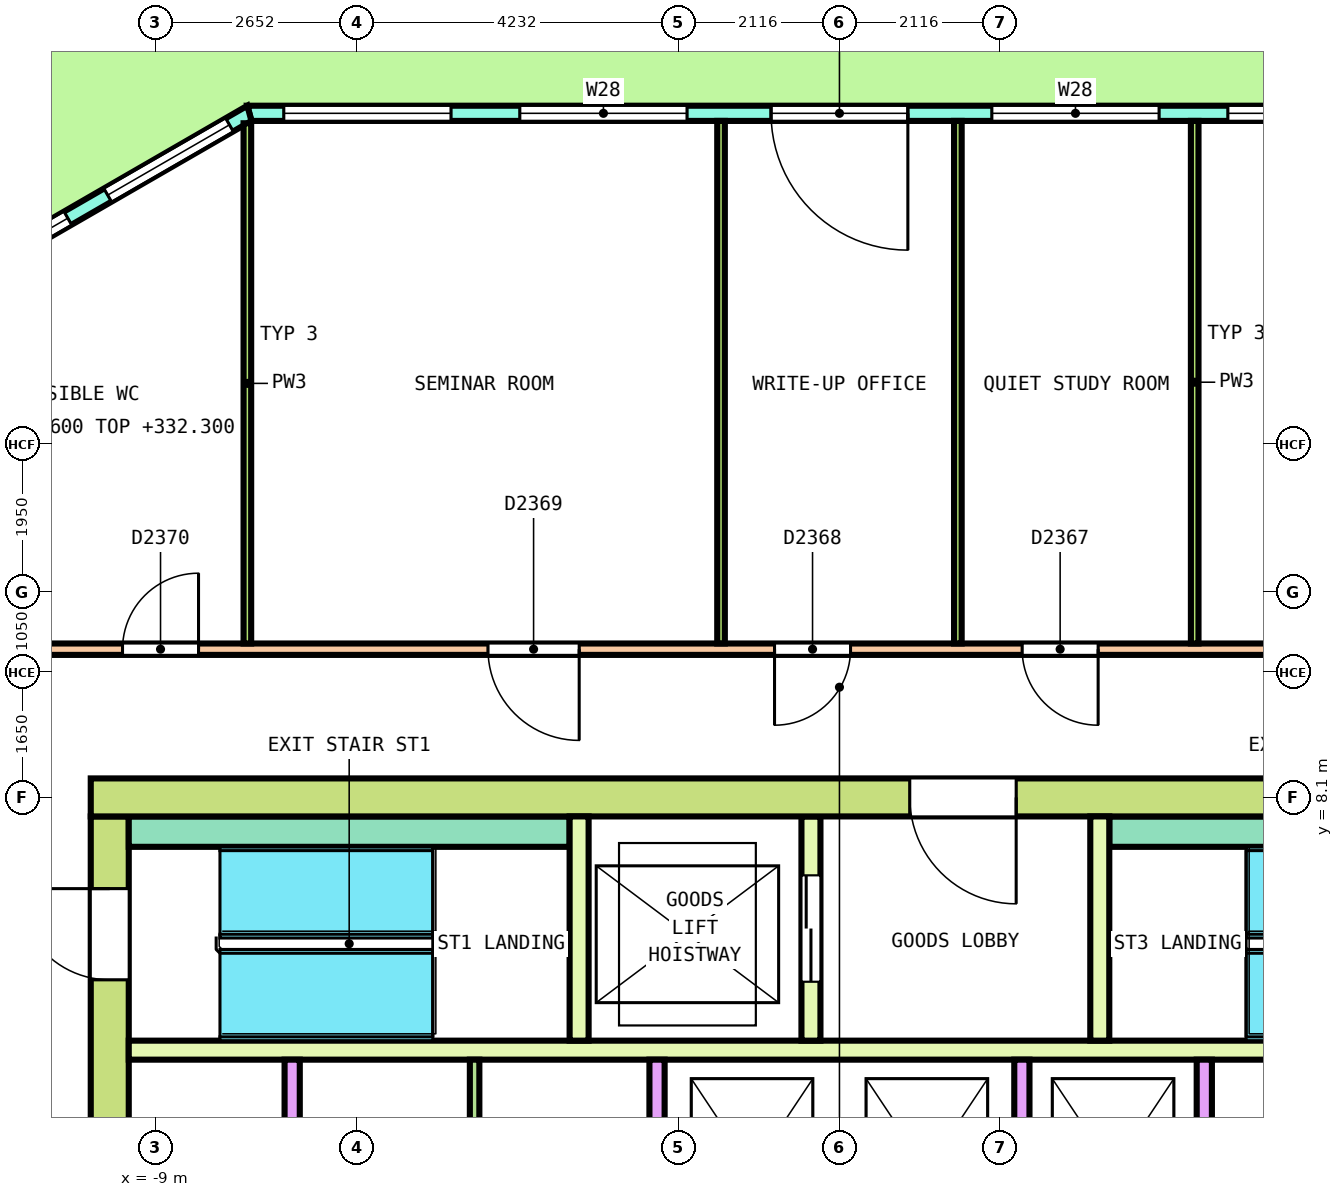
"""IFC4 building model, lengths in metres.
Left out: names, types, materials, properties, quantities, classifications, styles, units other than length and angle.
Written with IfcOpenShell. Run it as: python <this file> out.ifc"""

import sys

from ifc_helpers import new_model, si_unit, direction, frame, frame_2d, origin, place, context, subcontext, project, spatial, polyline, rectangle, outline, extrude, element, fill, save


model = new_model("IFC4")
c1 = context("Model", 3, precision=1e-05, world=origin(), true_north=direction((0.0, 1.0)))
c2 = subcontext(c1, "Body", "Model", "MODEL_VIEW")
j1 = project(units=[si_unit("LENGTHUNIT", "METRE"), si_unit("PLANEANGLEUNIT", "RADIAN")], contexts=[c1])
p1 = place(None, origin())
s1 = spatial("IfcSite", under=j1, at=p1, CompositionType="ELEMENT")
p2 = place(p1, origin())
s2 = spatial("IfcBuilding", under=s1, at=p2, CompositionType="ELEMENT")
p3 = place(p2, frame((0.0, 0.0, 328.6)))
s3 = spatial("IfcBuildingStorey", under=s2, at=p3, CompositionType="ELEMENT", Elevation=328.6)
p4 = place(p3, frame((7.763, 17.1, 0.0), z_axis=(0.0, 0.0, 1.0), x_axis=(-1.0, 0.0, 0.0)))
e1 = element("IfcWall", 1, at=p4, inside=s3, PredefinedType="SOLIDWALL", context=c2, shape_type="SweptSolid", body=[
    extrude(outline(polyline([(-0.027, -0.1), (1.012, -0.1), (2.05, -0.1), (3.089, -0.1), (4.128, -0.1), (5.166, -0.1), (6.205, -0.1), (7.243, -0.1), (8.282, -0.1), (9.321, -0.1), (10.359, -0.1), (11.398, -0.1), (12.437, -0.1), (13.475, -0.1), (14.514, -0.1), (15.552, -0.1), (15.499, 0.1), (14.467, 0.1), (13.436, 0.1), (12.404, 0.1), (11.373, 0.1), (10.341, 0.1), (9.31, 0.1), (8.278, 0.1), (7.247, 0.1), (6.216, 0.1), (5.184, 0.1), (4.153, 0.1), (3.121, 0.1), (2.09, 0.1), (1.058, 0.1), (0.027, 0.1), (-0.027, -0.1)])), origin(), (0.0, 0.0, 1.0), 3.7),
])
p5 = place(p4, frame((0.452, 0.0, 0.1)))
e2 = element("IfcOpeningElement", 2, at=p5, cuts=e1, PredefinedType="OPENING", context=c2, shape_type="SweptSolid", body=[
    extrude(rectangle(XDim=2.2, YDim=2.9, at=frame_2d((1.1, 1.45))), frame((0.0, 0.11, 0.0), z_axis=(0.0, -1.0, 0.0), x_axis=(1.0, 0.0, 0.0)), (0.0, 0.0, 1.0), 0.22),
])
p6 = place(p4, frame((3.558, 0.0, 0.1)))
e3 = element("IfcOpeningElement", 3, at=p6, cuts=e1, PredefinedType="OPENING", context=c2, shape_type="SweptSolid", body=[
    extrude(rectangle(XDim=2.2, YDim=2.9, at=frame_2d((1.1, 1.45))), frame((0.0, 0.11, 0.0), z_axis=(0.0, -1.0, 0.0), x_axis=(1.0, 0.0, 0.0)), (0.0, 0.0, 1.0), 0.22),
])
p7 = place(p4, frame((6.863, 0.0, 0.0)))
e4 = element("IfcOpeningElement", 4, at=p7, cuts=e1, PredefinedType="OPENING", context=c2, shape_type="SweptSolid", body=[
    extrude(rectangle(XDim=1.8, YDim=2.4, at=frame_2d((0.9, 1.2))), frame((0.0, 0.11, 0.0), z_axis=(0.0, -1.0, 0.0), x_axis=(1.0, 0.0, 0.0)), (0.0, 0.0, 1.0), 0.22),
])
p8 = place(p4, frame((6.863, 0.0, 2.55)))
e5 = element("IfcOpeningElement", 5, at=p8, cuts=e1, PredefinedType="OPENING", context=c2, shape_type="SweptSolid", body=[
    extrude(rectangle(XDim=1.8, YDim=0.45, at=frame_2d((0.9, 0.225))), frame((0.0, 0.11, 0.0), z_axis=(0.0, -1.0, 0.0), x_axis=(1.0, 0.0, 0.0)), (0.0, 0.0, 1.0), 0.22),
])
p9 = place(p4, frame((9.768, 0.0, 0.1)))
e6 = element("IfcOpeningElement", 6, at=p9, cuts=e1, PredefinedType="OPENING", context=c2, shape_type="SweptSolid", body=[
    extrude(rectangle(XDim=2.2, YDim=2.9, at=frame_2d((1.1, 1.45))), frame((0.0, 0.11, 0.0), z_axis=(0.0, -1.0, 0.0), x_axis=(1.0, 0.0, 0.0)), (0.0, 0.0, 1.0), 0.22),
])
p10 = place(p4, frame((12.873, 0.0, 0.1)))
e7 = element("IfcOpeningElement", 7, at=p10, cuts=e1, PredefinedType="OPENING", context=c2, shape_type="SweptSolid", body=[
    extrude(rectangle(XDim=2.2, YDim=2.9, at=frame_2d((1.1, 1.45))), frame((0.0, 0.11, 0.0), z_axis=(0.0, -1.0, 0.0), x_axis=(1.0, 0.0, 0.0)), (0.0, 0.0, 1.0), 0.22),
])
p11 = place(p3, frame((-7.763, 17.1, 0.0), z_axis=(0.0, 0.0, 1.0), x_axis=(-0.866029143232, -0.499993523031, 0.0)))
e8 = element("IfcWall", 8, at=p11, inside=s3, PredefinedType="SOLIDWALL", context=c2, shape_type="SweptSolid", body=[
    extrude(outline(polyline([(-0.027, -0.1), (1.214, -0.1), (2.456, -0.1), (3.697, -0.1), (4.938, -0.1), (4.885, 0.1), (3.67, 0.1), (2.456, 0.1), (1.241, 0.1), (0.027, 0.1), (-0.027, -0.1)])), origin(), (0.0, 0.0, 1.0), 3.7),
])
p12 = place(p11, frame((0.303, 0.0, 0.1)))
e9 = element("IfcOpeningElement", 9, at=p12, cuts=e8, PredefinedType="OPENING", context=c2, shape_type="SweptSolid", body=[
    extrude(rectangle(XDim=1.85, YDim=2.9, at=frame_2d((0.925, 1.45))), frame((0.0, 0.11, 0.0), z_axis=(0.0, -1.0, 0.0), x_axis=(1.0, 0.0, 0.0)), (0.0, 0.0, 1.0), 0.22),
])
p13 = place(p11, frame((2.759, 0.0, 0.1)))
e10 = element("IfcOpeningElement", 10, at=p13, cuts=e8, PredefinedType="OPENING", context=c2, shape_type="SweptSolid", body=[
    extrude(rectangle(XDim=1.85, YDim=2.9, at=frame_2d((0.925, 1.45))), frame((0.0, 0.11, 0.0), z_axis=(0.0, -1.0, 0.0), x_axis=(1.0, 0.0, 0.0)), (0.0, 0.0, 1.0), 0.22),
])
p14 = place(p3, frame((-9.85, 8.1, 0.0), z_axis=(0.0, 0.0, 1.0), x_axis=(1.0, 0.0, 0.0)))
e11 = element("IfcWall", 11, at=p14, inside=s3, PredefinedType="SHEAR", context=c2, shape_type="SweptSolid", body=[
    extrude(rectangle(XDim=19.7, YDim=0.5, at=frame_2d((9.85, 0.0))), origin(), (0.0, 0.0, 1.0), 3.7),
])
p15 = place(p14, frame((10.775, 0.0, 0.0)))
e12 = element("IfcOpeningElement", 12, at=p15, cuts=e11, PredefinedType="OPENING", context=c2, shape_type="SweptSolid", body=[
    extrude(rectangle(XDim=1.4, YDim=2.1, at=frame_2d((0.7, 1.05))), frame((0.0, 0.26, 0.0), z_axis=(0.0, -1.0, 0.0), x_axis=(1.0, 0.0, 0.0)), (0.0, 0.0, 1.0), 0.52),
])
p16 = place(p3, frame((-9.6, -7.85, 0.0), z_axis=(0.0, 0.0, 1.0), x_axis=(0.0, 1.0, 0.0)))
e13 = element("IfcWall", 13, at=p16, inside=s3, PredefinedType="SHEAR", context=c2, shape_type="SweptSolid", body=[
    extrude(rectangle(XDim=15.7, YDim=0.5, at=frame_2d((7.85, 0.0))), origin(), (0.0, 0.0, 1.0), 3.7),
])
p17 = place(p16, frame((6.65, 0.0, 0.0)))
e14 = element("IfcOpeningElement", 14, at=p17, cuts=e13, PredefinedType="OPENING", context=c2, shape_type="SweptSolid", body=[
    extrude(rectangle(XDim=2.4, YDim=2.1, at=frame_2d((1.2, 1.05))), frame((0.0, 0.26, 0.0), z_axis=(0.0, -1.0, 0.0), x_axis=(1.0, 0.0, 0.0)), (0.0, 0.0, 1.0), 0.52),
])
p18 = place(p16, frame((13.55, 0.0, 0.0)))
e15 = element("IfcOpeningElement", 15, at=p18, cuts=e13, PredefinedType="OPENING", context=c2, shape_type="SweptSolid", body=[
    extrude(rectangle(XDim=1.2, YDim=2.1, at=frame_2d((0.6, 1.05))), frame((0.0, 0.26, 0.0), z_axis=(0.0, -1.0, 0.0), x_axis=(1.0, 0.0, 0.0)), (0.0, 0.0, 1.0), 0.52),
])
p19 = place(p16, frame((0.95, 0.0, 0.0)))
e16 = element("IfcOpeningElement", 16, at=p19, cuts=e13, PredefinedType="OPENING", context=c2, shape_type="SweptSolid", body=[
    extrude(rectangle(XDim=1.2, YDim=2.1, at=frame_2d((0.6, 1.05))), frame((0.0, 0.26, 0.0), z_axis=(0.0, -1.0, 0.0), x_axis=(1.0, 0.0, 0.0)), (0.0, 0.0, 1.0), 0.52),
])
p20 = place(p3, frame((-9.35, 4.775, 0.0), z_axis=(0.0, 0.0, 1.0), x_axis=(1.0, 0.0, 0.0)))
e17 = element("IfcWall", 17, at=p20, inside=s3, PredefinedType="SOLIDWALL", context=c2, shape_type="SweptSolid", body=[
    extrude(rectangle(XDim=18.7, YDim=0.25, at=frame_2d((9.35, 0.0))), origin(), (0.0, 0.0, 1.0), 3.7),
])
for number, where, z_axis, x_axis in (
    (18, (-7.2, 1.75, 0.0), (0.0, 0.0, 1.0), (0.0, 1.0, 0.0)),
    (19, (-2.4, 1.75, 0.0), (0.0, 0.0, 1.0), (0.0, 1.0, 0.0)),
    (20, (2.4, 1.75, 0.0), (0.0, 0.0, 1.0), (0.0, 1.0, 0.0)),
    (21, (4.8, 1.75, 0.0), (0.0, 0.0, 1.0), (0.0, 1.0, 0.0)),
):
    element("IfcWall", number, at=place(p3, frame(where, z_axis=z_axis, x_axis=x_axis)), inside=s3, PredefinedType="SOLIDWALL", context=c2, shape_type="SweptSolid", body=[
        extrude(rectangle(XDim=2.9, YDim=0.2, at=frame_2d((1.45, 0.0))), origin(), (0.0, 0.0, 1.0), 3.7),
    ])
for number, where, z_axis, x_axis in (
    (22, (-9.35, 7.65, 0.0), (0.0, 0.0, 1.0), (1.0, 0.0, 0.0)),
    (23, (3.55, 7.65, 0.0), (0.0, 0.0, 1.0), (1.0, 0.0, 0.0)),
):
    element("IfcWall", number, at=place(p3, frame(where, z_axis=z_axis, x_axis=x_axis)), inside=s3, PredefinedType="SOLIDWALL", context=c2, shape_type="SweptSolid", body=[
        extrude(rectangle(XDim=5.8, YDim=0.4, at=frame_2d((2.9, 0.0))), origin(), (0.0, 0.0, 1.0), 3.7),
    ])
p21 = place(p3, frame((-3.425, 4.9, 0.0), z_axis=(0.0, 0.0, 1.0), x_axis=(0.0, 1.0, 0.0)))
e24 = element("IfcWall", 24, at=p21, inside=s3, PredefinedType="SOLIDWALL", context=c2, shape_type="SweptSolid", body=[
    extrude(rectangle(XDim=2.95, YDim=0.25, at=frame_2d((1.475, 0.0))), origin(), (0.0, 0.0, 1.0), 3.7),
])
p22 = place(p3, frame((-0.375, 4.9, 0.0), z_axis=(0.0, 0.0, 1.0), x_axis=(0.0, 1.0, 0.0)))
e25 = element("IfcWall", 25, at=p22, inside=s3, PredefinedType="SOLIDWALL", context=c2, shape_type="SweptSolid", body=[
    extrude(rectangle(XDim=2.95, YDim=0.25, at=frame_2d((1.475, 0.0))), origin(), (0.0, 0.0, 1.0), 3.7),
])
p23 = place(p22, frame((0.775, 0.0, 0.0)))
e26 = element("IfcOpeningElement", 26, at=p23, cuts=e25, PredefinedType="OPENING", context=c2, shape_type="SweptSolid", body=[
    extrude(rectangle(XDim=1.4, YDim=2.1, at=frame_2d((0.7, 1.05))), frame((0.0, 0.135, 0.0), z_axis=(0.0, -1.0, 0.0), x_axis=(1.0, 0.0, 0.0)), (0.0, 0.0, 1.0), 0.27),
])
p24 = place(p3, frame((3.425, 4.9, 0.0), z_axis=(0.0, 0.0, 1.0), x_axis=(0.0, 1.0, 0.0)))
e27 = element("IfcWall", 27, at=p24, inside=s3, PredefinedType="SOLIDWALL", context=c2, shape_type="SweptSolid", body=[
    extrude(rectangle(XDim=2.95, YDim=0.25, at=frame_2d((1.475, 0.0))), origin(), (0.0, 0.0, 1.0), 3.7),
])
p25 = place(p3, frame((-4.8, 1.75, 0.0), z_axis=(0.0, 0.0, 1.0), x_axis=(0.0, 1.0, 0.0)))
e28 = element("IfcWall", 28, at=p25, inside=s3, PredefinedType="PARTITIONING", context=c2, shape_type="SweptSolid", body=[
    extrude(rectangle(XDim=2.9, YDim=0.125, at=frame_2d((1.45, 0.0))), origin(), (0.0, 0.0, 1.0), 3.7),
])
p26 = place(p3, frame((-10.875, 10.05, 0.0), z_axis=(0.0, 0.0, 1.0), x_axis=(1.0, 0.0, 0.0)))
e29 = element("IfcWall", 29, at=p26, inside=s3, PredefinedType="PARTITIONING", context=c2, shape_type="SweptSolid", body=[
    extrude(rectangle(XDim=21.9, YDim=0.15, at=frame_2d((10.95, 0.0))), origin(), (0.0, 0.0, 1.0), 3.05),
])
p27 = place(p26, frame((18.743, 0.0, 0.0)))
e30 = element("IfcOpeningElement", 30, at=p27, cuts=e29, PredefinedType="OPENING", context=c2, shape_type="SweptSolid", body=[
    extrude(rectangle(XDim=1.2, YDim=2.1, at=frame_2d((0.6, 1.05))), frame((0.0, 0.085, 0.0), z_axis=(0.0, -1.0, 0.0), x_axis=(1.0, 0.0, 0.0)), (0.0, 0.0, 1.0), 0.17),
])
p28 = place(p26, frame((13.278, 0.0, 0.0)))
e31 = element("IfcOpeningElement", 31, at=p28, cuts=e29, PredefinedType="OPENING", context=c2, shape_type="SweptSolid", body=[
    extrude(rectangle(XDim=1.0, YDim=2.1, at=frame_2d((0.5, 1.05))), frame((0.0, 0.085, 0.0), z_axis=(0.0, -1.0, 0.0), x_axis=(1.0, 0.0, 0.0)), (0.0, 0.0, 1.0), 0.17),
])
p29 = place(p26, frame((10.021, 0.0, 0.0)))
e32 = element("IfcOpeningElement", 32, at=p29, cuts=e29, PredefinedType="OPENING", context=c2, shape_type="SweptSolid", body=[
    extrude(rectangle(XDim=1.0, YDim=2.1, at=frame_2d((0.5, 1.05))), frame((0.0, 0.085, 0.0), z_axis=(0.0, -1.0, 0.0), x_axis=(1.0, 0.0, 0.0)), (0.0, 0.0, 1.0), 0.17),
])
p30 = place(p26, frame((6.251, 0.0, 0.0)))
e33 = element("IfcOpeningElement", 33, at=p30, cuts=e29, PredefinedType="OPENING", context=c2, shape_type="SweptSolid", body=[
    extrude(rectangle(XDim=1.2, YDim=2.1, at=frame_2d((0.6, 1.05))), frame((0.0, 0.085, 0.0), z_axis=(0.0, -1.0, 0.0), x_axis=(1.0, 0.0, 0.0)), (0.0, 0.0, 1.0), 0.17),
])
p31 = place(p26, frame((1.443, 0.0, 0.0)))
e34 = element("IfcOpeningElement", 34, at=p31, cuts=e29, PredefinedType="OPENING", context=c2, shape_type="SweptSolid", body=[
    extrude(rectangle(XDim=1.0, YDim=2.1, at=frame_2d((0.5, 1.05))), frame((0.0, 0.085, 0.0), z_axis=(0.0, -1.0, 0.0), x_axis=(1.0, 0.0, 0.0)), (0.0, 0.0, 1.0), 0.17),
])
for number, where, z_axis, x_axis in (
    (35, (4.674, 10.125, 0.0), (0.0, 0.0, 1.0), (0.0, 1.0, 0.0)),
    (36, (1.558, 10.125, 0.0), (0.0, 0.0, 1.0), (0.0, 1.0, 0.0)),
    (37, (-1.558, 10.125, 0.0), (0.0, 0.0, 1.0), (0.0, 1.0, 0.0)),
):
    element("IfcWall", number, at=place(p3, frame(where, z_axis=z_axis, x_axis=x_axis)), inside=s3, PredefinedType="PARTITIONING", context=c2, shape_type="SweptSolid", body=[
        extrude(rectangle(XDim=6.875, YDim=0.1, at=frame_2d((3.438, 0.0))), origin(), (0.0, 0.0, 1.0), 3.05),
    ])
p32 = place(p3, frame((-7.79, 10.125, 0.0), z_axis=(0.0, 0.0, 1.0), x_axis=(0.0, 1.0, 0.0)))
e38 = element("IfcWall", 38, at=p32, inside=s3, PredefinedType="PARTITIONING", context=c2, shape_type="SweptSolid", body=[
    extrude(rectangle(XDim=6.844, YDim=0.1, at=frame_2d((3.422, 0.0))), origin(), (0.0, 0.0, 1.0), 3.05),
])
p33 = place(p5, origin())
e39 = element("IfcWindow", 39, at=p33, inside=s3, PartitioningType="SINGLE_PANEL", PredefinedType="WINDOW", context=c2, shape_type="SweptSolid", body=[
    extrude(rectangle(XDim=2.2, YDim=2.9, at=frame_2d((1.1, 1.45))), frame((0.0, 0.03, 0.0), z_axis=(0.0, -1.0, 0.0), x_axis=(1.0, 0.0, 0.0)), (0.0, 0.0, 1.0), 0.06),
])
fill(e2, e39)
p34 = place(p6, origin())
e40 = element("IfcWindow", 40, at=p34, inside=s3, PartitioningType="SINGLE_PANEL", PredefinedType="WINDOW", context=c2, shape_type="SweptSolid", body=[
    extrude(rectangle(XDim=2.2, YDim=2.9, at=frame_2d((1.1, 1.45))), frame((0.0, 0.03, 0.0), z_axis=(0.0, -1.0, 0.0), x_axis=(1.0, 0.0, 0.0)), (0.0, 0.0, 1.0), 0.06),
])
fill(e3, e40)
p35 = place(p7, origin())
e41 = element("IfcDoor", 41, at=p35, inside=s3, OperationType="DOUBLE_DOOR_SINGLE_SWING", PredefinedType="DOOR", context=c2, shape_type="SweptSolid", body=[
    extrude(rectangle(XDim=1.8, YDim=2.4, at=frame_2d((0.9, 1.2))), frame((0.0, 0.025, 0.0), z_axis=(0.0, -1.0, 0.0), x_axis=(1.0, 0.0, 0.0)), (0.0, 0.0, 1.0), 0.05),
])
fill(e4, e41)
p36 = place(p8, origin())
e42 = element("IfcWindow", 42, at=p36, inside=s3, PartitioningType="SINGLE_PANEL", PredefinedType="WINDOW", context=c2, shape_type="SweptSolid", body=[
    extrude(rectangle(XDim=1.8, YDim=0.45, at=frame_2d((0.9, 0.225))), frame((0.0, 0.03, 0.0), z_axis=(0.0, -1.0, 0.0), x_axis=(1.0, 0.0, 0.0)), (0.0, 0.0, 1.0), 0.06),
])
fill(e5, e42)
p37 = place(p9, origin())
e43 = element("IfcWindow", 43, at=p37, inside=s3, PartitioningType="SINGLE_PANEL", PredefinedType="WINDOW", context=c2, shape_type="SweptSolid", body=[
    extrude(rectangle(XDim=2.2, YDim=2.9, at=frame_2d((1.1, 1.45))), frame((0.0, 0.03, 0.0), z_axis=(0.0, -1.0, 0.0), x_axis=(1.0, 0.0, 0.0)), (0.0, 0.0, 1.0), 0.06),
])
fill(e6, e43)
p38 = place(p10, origin())
e44 = element("IfcWindow", 44, at=p38, inside=s3, PartitioningType="SINGLE_PANEL", PredefinedType="WINDOW", context=c2, shape_type="SweptSolid", body=[
    extrude(rectangle(XDim=2.2, YDim=2.9, at=frame_2d((1.1, 1.45))), frame((0.0, 0.03, 0.0), z_axis=(0.0, -1.0, 0.0), x_axis=(1.0, 0.0, 0.0)), (0.0, 0.0, 1.0), 0.06),
])
fill(e7, e44)
p39 = place(p12, origin())
e45 = element("IfcWindow", 45, at=p39, inside=s3, PartitioningType="SINGLE_PANEL", PredefinedType="WINDOW", context=c2, shape_type="SweptSolid", body=[
    extrude(rectangle(XDim=1.85, YDim=2.9, at=frame_2d((0.925, 1.45))), frame((0.0, 0.03, 0.0), z_axis=(0.0, -1.0, 0.0), x_axis=(1.0, 0.0, 0.0)), (0.0, 0.0, 1.0), 0.06),
])
fill(e9, e45)
p40 = place(p13, origin())
e46 = element("IfcWindow", 46, at=p40, inside=s3, PartitioningType="SINGLE_PANEL", PredefinedType="WINDOW", context=c2, shape_type="SweptSolid", body=[
    extrude(rectangle(XDim=1.85, YDim=2.9, at=frame_2d((0.925, 1.45))), frame((0.0, 0.03, 0.0), z_axis=(0.0, -1.0, 0.0), x_axis=(1.0, 0.0, 0.0)), (0.0, 0.0, 1.0), 0.06),
])
fill(e10, e46)
p41 = place(p23, origin())
e47 = element("IfcDoor", 47, at=p41, inside=s3, OperationType="DOUBLE_DOOR_SLIDING", PredefinedType="DOOR", context=c2, shape_type="SweptSolid", body=[
    extrude(rectangle(XDim=1.4, YDim=2.1, at=frame_2d((0.7, 1.05))), frame((0.0, 0.075, 0.0), z_axis=(0.0, -1.0, 0.0), x_axis=(1.0, 0.0, 0.0)), (0.0, 0.0, 1.0), 0.15),
])
fill(e26, e47)
p42 = place(p18, origin())
e48 = element("IfcDoor", 48, at=p42, inside=s3, OperationType="SINGLE_SWING_RIGHT", PredefinedType="DOOR", context=c2, shape_type="SweptSolid", body=[
    extrude(rectangle(XDim=1.2, YDim=2.1, at=frame_2d((0.6, 1.05))), frame((0.0, 0.2, 0.0), z_axis=(0.0, -1.0, 0.0), x_axis=(1.0, 0.0, 0.0)), (0.0, 0.0, 1.0), 0.4),
])
fill(e15, e48)
p43 = place(p15, origin())
e49 = element("IfcDoor", 49, at=p43, inside=s3, OperationType="DOUBLE_DOOR_SINGLE_SWING", PredefinedType="DOOR", context=c2, shape_type="SweptSolid", body=[
    extrude(rectangle(XDim=1.4, YDim=2.1, at=frame_2d((0.7, 1.05))), frame((0.0, 0.2, 0.0), z_axis=(0.0, -1.0, 0.0), x_axis=(1.0, 0.0, 0.0)), (0.0, 0.0, 1.0), 0.4),
])
fill(e12, e49)
p44 = place(p28, origin())
e50 = element("IfcDoor", 50, at=p44, inside=s3, OperationType="SINGLE_SWING_RIGHT", PredefinedType="DOOR", context=c2, shape_type="SweptSolid", body=[
    extrude(rectangle(XDim=1.0, YDim=2.1, at=frame_2d((0.5, 1.05))), frame((0.0, 0.025, 0.0), z_axis=(0.0, -1.0, 0.0), x_axis=(1.0, 0.0, 0.0)), (0.0, 0.0, 1.0), 0.05),
])
fill(e31, e50)
p45 = place(p29, origin())
e51 = element("IfcDoor", 51, at=p45, inside=s3, OperationType="SINGLE_SWING_LEFT", PredefinedType="DOOR", context=c2, shape_type="SweptSolid", body=[
    extrude(rectangle(XDim=1.0, YDim=2.1, at=frame_2d((0.5, 1.05))), frame((0.0, 0.025, 0.0), z_axis=(0.0, -1.0, 0.0), x_axis=(1.0, 0.0, 0.0)), (0.0, 0.0, 1.0), 0.05),
])
fill(e32, e51)
p46 = place(p30, origin())
e52 = element("IfcDoor", 52, at=p46, inside=s3, OperationType="DOUBLE_DOOR_SINGLE_SWING", PredefinedType="DOOR", context=c2, shape_type="SweptSolid", body=[
    extrude(rectangle(XDim=1.2, YDim=2.1, at=frame_2d((0.6, 1.05))), frame((0.0, 0.025, 0.0), z_axis=(0.0, -1.0, 0.0), x_axis=(1.0, 0.0, 0.0)), (0.0, 0.0, 1.0), 0.05),
])
fill(e33, e52)
p47 = place(p31, origin())
e53 = element("IfcDoor", 53, at=p47, inside=s3, OperationType="SINGLE_SWING_RIGHT", PredefinedType="DOOR", context=c2, shape_type="SweptSolid", body=[
    extrude(rectangle(XDim=1.0, YDim=2.1, at=frame_2d((0.5, 1.05))), frame((0.0, 0.025, 0.0), z_axis=(0.0, -1.0, 0.0), x_axis=(1.0, 0.0, 0.0)), (0.0, 0.0, 1.0), 0.05),
])
fill(e34, e53)
save(model, sys.argv[1])
